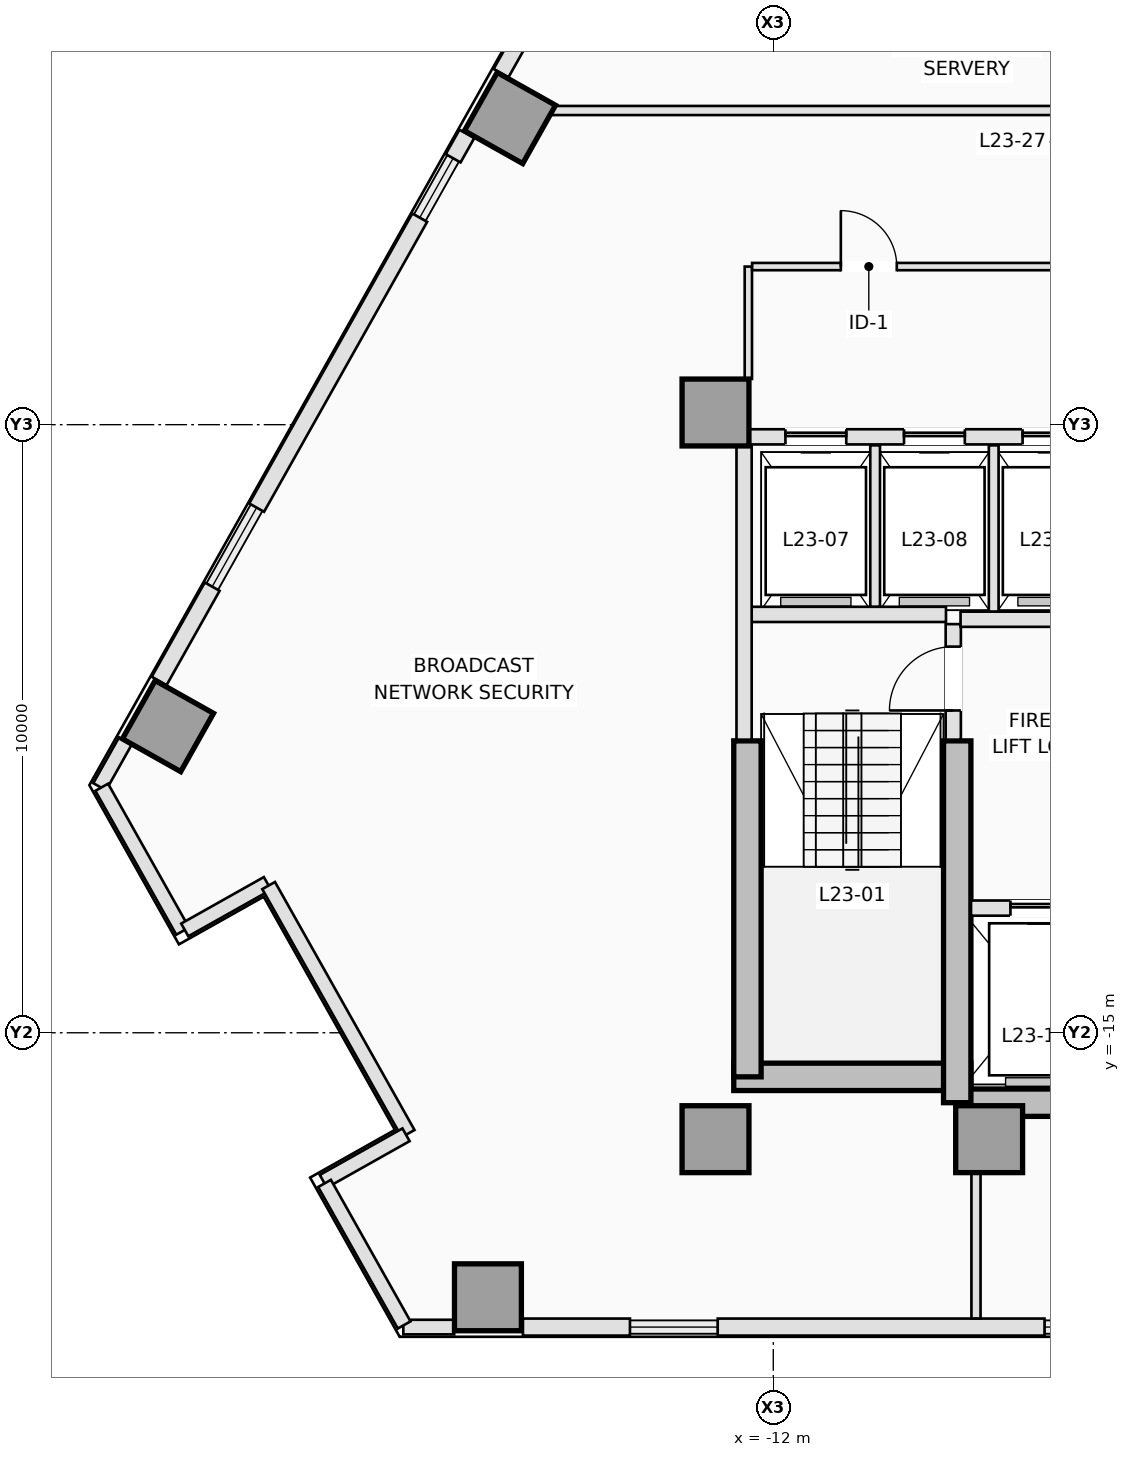
"""IFC4 building model, lengths in metres.
Left out: names, types, materials, properties, quantities, classifications, styles, units other than length and angle.
Written with IfcOpenShell. Run it as: python <this file> out.ifc"""

import sys

from ifc_helpers import new_model, si_unit, direction, frame, frame_2d, origin, origin_2d, place, context, subcontext, project, spatial, rectangle, extrude, element, fill, save


model = new_model("IFC4")
c1 = context("Model", 3, precision=1e-05, world=origin(), true_north=direction((0.0, 1.0)))
c2 = subcontext(c1, "Body", "Model", "MODEL_VIEW")
j1 = project(units=[si_unit("LENGTHUNIT", "METRE"), si_unit("PLANEANGLEUNIT", "RADIAN")], contexts=[c1])
p1 = place(None, origin())
s1 = spatial("IfcSite", under=j1, at=p1, CompositionType="ELEMENT")
p2 = place(p1, origin())
s2 = spatial("IfcBuilding", under=s1, at=p2, CompositionType="ELEMENT")
p3 = place(p2, frame((0.0, 0.0, 87.1)))
s3 = spatial("IfcBuildingStorey", under=s2, at=p3, CompositionType="ELEMENT", Elevation=87.1)
p4 = place(p3, frame((-12.65, -15.725, 0.0), z_axis=(0.0, 0.0, 1.0), x_axis=(1.0, 0.0, 0.0)))
e1 = element("IfcWall", 1, at=p4, inside=s3, PredefinedType="SHEAR", context=c2, shape_type="SweptSolid", body=[
    extrude(rectangle(XDim=3.9, YDim=0.45, at=frame_2d((1.95, 0.0))), origin(), (0.0, 0.0, 1.0), 3.5),
])
p5 = place(p3, frame((-8.975, -16.15, 0.0), z_axis=(0.0, 0.0, 1.0), x_axis=(1.0, 0.0, 0.0)))
e2 = element("IfcWall", 2, at=p5, inside=s3, PredefinedType="SHEAR", context=c2, shape_type="SweptSolid", body=[
    extrude(rectangle(XDim=5.225, YDim=0.45, at=frame_2d((2.613, 0.0))), origin(), (0.0, 0.0, 1.0), 3.5),
])
p6 = place(p3, frame((-12.425, -15.725, 0.0), z_axis=(0.0, 0.0, 1.0), x_axis=(0.0, 1.0, 0.0)))
e3 = element("IfcWall", 3, at=p6, inside=s3, PredefinedType="SHEAR", context=c2, shape_type="SweptSolid", body=[
    extrude(rectangle(XDim=5.525, YDim=0.45, at=frame_2d((2.763, 0.0))), origin(), (0.0, 0.0, 1.0), 3.5),
])
p7 = place(p3, frame((-8.975, -16.15, 0.0), z_axis=(0.0, 0.0, 1.0), x_axis=(0.0, 1.0, 0.0)))
e4 = element("IfcWall", 4, at=p7, inside=s3, PredefinedType="SHEAR", context=c2, shape_type="SweptSolid", body=[
    extrude(rectangle(XDim=5.95, YDim=0.45, at=frame_2d((2.975, 0.0))), origin(), (0.0, 0.0, 1.0), 3.5),
])
for number, where, z_axis, x_axis in (
    (5, (-12.95, -16.75, 0.0), (0.0, 0.0, 1.0), (1.0, 0.0, 0.0)),
    (6, (-8.45, -16.75, 0.0), (0.0, 0.0, 1.0), (1.0, 0.0, 0.0)),
    (7, (-12.95, -4.8, 0.0), (0.0, 0.0, 1.0), (1.0, 0.0, 0.0)),
    (8, (-16.692, -19.35, 0.0), (0.0, 0.0, 1.0), (0.0, 1.0, 0.0)),
    (9, (-16.33, 0.043, 0.0), (0.0, 0.0, 1.0), (-0.872, 0.49, 0.0)),
    (10, (-21.955, -9.957, 0.0), (0.0, 0.0, 1.0), (-0.872, 0.49, 0.0)),
):
    element("IfcColumn", number, at=place(p3, frame(where, z_axis=z_axis, x_axis=x_axis)), inside=s3, PredefinedType="COLUMN", context=c2, shape_type="SweptSolid", body=[
        extrude(rectangle(XDim=1.1, YDim=1.1, at=origin_2d()), origin(), (0.0, 0.0, 1.0), 3.5),
    ])
p8 = place(p3, frame((-17.248, -19.84, 0.0), z_axis=(0.0, 0.0, 1.0), x_axis=(-1.0, 0.0, 0.0)))
e11 = element("IfcWall", 11, at=p8, inside=s3, PredefinedType="STANDARD", context=c2, shape_type="SweptSolid", body=[
    extrude(rectangle(XDim=0.836, YDim=0.24, at=frame_2d((0.418, 0.0))), origin(), (0.0, 0.0, 1.0), 3.14),
])
p9 = place(p3, frame((-7.539, -19.84, 0.0), z_axis=(0.0, 0.0, 1.0), x_axis=(-1.0, 0.0, 0.0)))
e12 = element("IfcWall", 12, at=p9, inside=s3, PredefinedType="STANDARD", context=c2, shape_type="SweptSolid", body=[
    extrude(rectangle(XDim=5.374, YDim=0.28, at=frame_2d((2.687, 0.0))), origin(), (0.0, 0.0, 1.0), 3.14),
])
p10 = place(p3, frame((-14.357, -19.84, 0.0), z_axis=(0.0, 0.0, 1.0), x_axis=(-1.0, 0.0, 0.0)))
e13 = element("IfcWall", 13, at=p10, inside=s3, PredefinedType="STANDARD", context=c2, shape_type="SweptSolid", body=[
    extrude(rectangle(XDim=1.76, YDim=0.28, at=frame_2d((0.88, 0.0))), origin(), (0.0, 0.0, 1.0), 3.14),
])
p11 = place(p3, frame((-23.078, -10.954, 0.0), z_axis=(0.0, 0.0, 1.0), x_axis=(0.490355003566, 0.871522788272, 0.0)))
e14 = element("IfcWall", 14, at=p11, inside=s3, PredefinedType="STANDARD", context=c2, shape_type="SweptSolid", body=[
    extrude(rectangle(XDim=0.865, YDim=0.24, at=frame_2d((0.433, 0.0))), origin(), (0.0, 0.0, 1.0), 3.14),
])
p12 = place(p3, frame((-22.1, -9.215, 0.0), z_axis=(0.0, 0.0, 1.0), x_axis=(0.490248214463, 0.871582863654, 0.0)))
e15 = element("IfcWall", 15, at=p12, inside=s3, PredefinedType="STANDARD", context=c2, shape_type="SweptSolid", body=[
    extrude(rectangle(XDim=1.78, YDim=0.28, at=frame_2d((0.89, 0.0))), origin(), (0.0, 0.0, 1.0), 3.14),
])
p13 = place(p3, frame((-20.496, -6.364, 0.0), z_axis=(0.0, 0.0, 1.0), x_axis=(0.490240051056, 0.87158745536, 0.0)))
e16 = element("IfcWall", 16, at=p13, inside=s3, PredefinedType="STANDARD", context=c2, shape_type="SweptSolid", body=[
    extrude(rectangle(XDim=5.47, YDim=0.28, at=frame_2d((2.735, 0.0))), origin(), (0.0, 0.0, 1.0), 3.14),
])
p14 = place(p3, frame((-17.264, -0.619, 0.0), z_axis=(0.0, 0.0, 1.0), x_axis=(0.490009165718, 0.871717280724, 0.0)))
e17 = element("IfcWall", 17, at=p14, inside=s3, PredefinedType="STANDARD", context=c2, shape_type="SweptSolid", body=[
    extrude(rectangle(XDim=0.46, YDim=0.28, at=frame_2d((0.23, 0.0))), origin(), (0.0, 0.0, 1.0), 3.14),
])
p15 = place(p3, frame((-16.478, 0.78, 0.0), z_axis=(0.0, 0.0, 1.0), x_axis=(0.490280395622, 0.871564761603, 0.0)))
e18 = element("IfcWall", 18, at=p15, inside=s3, PredefinedType="STANDARD", context=c2, shape_type="SweptSolid", body=[
    extrude(rectangle(XDim=4.236, YDim=0.28, at=frame_2d((2.118, 0.0))), origin(), (0.0, 0.0, 1.0), 3.14),
])
p16 = place(p3, frame((-23.044, -10.963, 0.0), z_axis=(0.0, 0.0, 1.0), x_axis=(0.490218533594, -0.871599557894, 0.0)))
e19 = element("IfcWall", 19, at=p16, inside=s3, PredefinedType="STANDARD", context=c2, shape_type="SweptSolid", body=[
    extrude(rectangle(XDim=2.714, YDim=0.24, at=frame_2d((1.357, 0.0))), origin(), (0.0, 0.0, 1.0), 3.14),
])
p17 = place(p3, frame((-21.678, -13.309, 0.0), z_axis=(0.0, 0.0, 1.0), x_axis=(0.871546278971, 0.490313250496, 0.0)))
e20 = element("IfcWall", 20, at=p17, inside=s3, PredefinedType="STANDARD", context=c2, shape_type="SweptSolid", body=[
    extrude(rectangle(XDim=1.56, YDim=0.24, at=frame_2d((0.78, 0.0))), origin(), (0.0, 0.0, 1.0), 3.14),
])
p18 = place(p3, frame((-20.299, -12.579, 0.0), z_axis=(0.0, 0.0, 1.0), x_axis=(0.490313250496, -0.871546278971, 0.0)))
e21 = element("IfcWall", 21, at=p18, inside=s3, PredefinedType="STANDARD", context=c2, shape_type="SweptSolid", body=[
    extrude(rectangle(XDim=4.68, YDim=0.24, at=frame_2d((2.34, 0.0))), origin(), (0.0, 0.0, 1.0), 2.612),
])
p19 = place(p3, frame((-18.039, -16.677, 0.0), z_axis=(0.0, 0.0, 1.0), x_axis=(-0.871546278971, -0.490313250496, 0.0)))
e22 = element("IfcWall", 22, at=p19, inside=s3, PredefinedType="STANDARD", context=c2, shape_type="SweptSolid", body=[
    extrude(rectangle(XDim=1.56, YDim=0.24, at=frame_2d((0.78, 0.0))), origin(), (0.0, 0.0, 1.0), 3.14),
])
p20 = place(p3, frame((-19.379, -17.477, 0.0), z_axis=(0.0, 0.0, 1.0), x_axis=(0.49023085981, -0.871592625078, 0.0)))
e23 = element("IfcWall", 23, at=p20, inside=s3, PredefinedType="STANDARD", context=c2, shape_type="SweptSolid", body=[
    extrude(rectangle(XDim=2.671, YDim=0.24, at=frame_2d((1.335, 0.0))), origin(), (0.0, 0.0, 1.0), 3.14),
])
p21 = place(p3, frame((-9.04, -10.18, 0.0), z_axis=(0.0, 0.0, 1.0), x_axis=(0.0, 1.0, 0.0)))
e24 = element("IfcWall", 24, at=p21, inside=s3, PredefinedType="PARTITIONING", context=c2, shape_type="SweptSolid", body=[
    extrude(rectangle(XDim=1.9, YDim=0.25, at=frame_2d((0.95, 0.0))), origin(), (0.0, 0.0, 1.0), 3.14),
])
p22 = place(p21, frame((0.48, 0.0, 0.0)))
e25 = element("IfcOpeningElement", 25, at=p22, cuts=e24, PredefinedType="OPENING", context=c2, shape_type="SweptSolid", body=[
    extrude(rectangle(XDim=1.05, YDim=2.15, at=frame_2d((0.525, 1.075))), frame((0.0, 0.135, 0.0), z_axis=(0.0, -1.0, 0.0), x_axis=(1.0, 0.0, 0.0)), (0.0, 0.0, 1.0), 0.27),
])
p23 = place(p3, frame((-12.38, -8.12, 0.0), z_axis=(0.0, 0.0, 1.0), x_axis=(1.0, 0.0, 0.0)))
e26 = element("IfcWall", 26, at=p23, inside=s3, PredefinedType="PARTITIONING", context=c2, shape_type="SweptSolid", body=[
    extrude(rectangle(XDim=3.22, YDim=0.25, at=frame_2d((1.61, 0.0))), origin(), (0.0, 0.0, 1.0), 3.14),
])
p24 = place(p3, frame((-12.48, -10.18, 0.0), z_axis=(0.0, 0.0, 1.0), x_axis=(0.0, 1.0, 0.0)))
e27 = element("IfcWall", 27, at=p24, inside=s3, PredefinedType="PARTITIONING", context=c2, shape_type="SweptSolid", body=[
    extrude(rectangle(XDim=4.828, YDim=0.25, at=frame_2d((2.414, 0.0))), origin(), (0.0, 0.0, 1.0), 3.14),
])
p25 = place(p3, frame((-8.748, -12.95, 0.0), z_axis=(0.0, 0.0, 1.0), x_axis=(1.0, 0.0, 0.0)))
e28 = element("IfcWall", 28, at=p25, inside=s3, PredefinedType="PARTITIONING", context=c2, shape_type="SweptSolid", body=[
    extrude(rectangle(XDim=5.068, YDim=0.25, at=frame_2d((2.534, 0.0))), origin(), (0.0, 0.0, 1.0), 3.14),
])
p26 = place(p25, frame((0.648, 0.0, 0.0)))
e29 = element("IfcOpeningElement", 29, at=p26, cuts=e28, PredefinedType="OPENING", context=c2, shape_type="SweptSolid", body=[
    extrude(rectangle(XDim=1.1, YDim=2.15, at=frame_2d((0.55, 1.075))), frame((0.0, 0.135, 0.0), z_axis=(0.0, -1.0, 0.0), x_axis=(1.0, 0.0, 0.0)), (0.0, 0.0, 1.0), 0.27),
])
p27 = place(p25, frame((2.548, 0.0, 0.0)))
e30 = element("IfcOpeningElement", 30, at=p27, cuts=e28, PredefinedType="OPENING", context=c2, shape_type="SweptSolid", body=[
    extrude(rectangle(XDim=0.88, YDim=2.1, at=frame_2d((0.44, 1.05))), frame((0.0, 0.135, 0.0), z_axis=(0.0, -1.0, 0.0), x_axis=(1.0, 0.0, 0.0)), (0.0, 0.0, 1.0), 0.27),
])
p28 = place(p25, frame((3.948, 0.0, 0.0)))
e31 = element("IfcOpeningElement", 31, at=p28, cuts=e28, PredefinedType="OPENING", context=c2, shape_type="SweptSolid", body=[
    extrude(rectangle(XDim=0.88, YDim=2.1, at=frame_2d((0.44, 1.05))), frame((0.0, 0.135, 0.0), z_axis=(0.0, -1.0, 0.0), x_axis=(1.0, 0.0, 0.0)), (0.0, 0.0, 1.0), 0.27),
])
p29 = place(p3, frame((-8.92, -8.2, 0.0), z_axis=(0.0, 0.0, 1.0), x_axis=(1.0, 0.0, 0.0)))
e32 = element("IfcWall", 32, at=p29, inside=s3, PredefinedType="PARTITIONING", context=c2, shape_type="SweptSolid", body=[
    extrude(rectangle(XDim=5.24, YDim=0.25, at=frame_2d((2.62, 0.0))), origin(), (0.0, 0.0, 1.0), 3.14),
])
p30 = place(p3, frame((-12.398, -5.2, 0.0), z_axis=(0.0, 0.0, 1.0), x_axis=(1.0, 0.0, 0.0)))
e33 = element("IfcWall", 33, at=p30, inside=s3, PredefinedType="PARTITIONING", context=c2, shape_type="SweptSolid", body=[
    extrude(rectangle(XDim=8.096, YDim=0.25, at=frame_2d((4.048, 0.0))), origin(), (0.0, 0.0, 1.0), 3.14),
])
p31 = place(p30, frame((0.598, 0.0, 0.0)))
e34 = element("IfcOpeningElement", 34, at=p31, cuts=e33, PredefinedType="OPENING", context=c2, shape_type="SweptSolid", body=[
    extrude(rectangle(XDim=1.0, YDim=2.15, at=frame_2d((0.5, 1.075))), frame((0.0, 0.135, 0.0), z_axis=(0.0, -1.0, 0.0), x_axis=(1.0, 0.0, 0.0)), (0.0, 0.0, 1.0), 0.27),
])
p32 = place(p30, frame((2.548, 0.0, 0.0)))
e35 = element("IfcOpeningElement", 35, at=p32, cuts=e33, PredefinedType="OPENING", context=c2, shape_type="SweptSolid", body=[
    extrude(rectangle(XDim=1.0, YDim=2.15, at=frame_2d((0.5, 1.075))), frame((0.0, 0.135, 0.0), z_axis=(0.0, -1.0, 0.0), x_axis=(1.0, 0.0, 0.0)), (0.0, 0.0, 1.0), 0.27),
])
p33 = place(p30, frame((4.498, 0.0, 0.0)))
e36 = element("IfcOpeningElement", 36, at=p33, cuts=e33, PredefinedType="OPENING", context=c2, shape_type="SweptSolid", body=[
    extrude(rectangle(XDim=1.0, YDim=2.15, at=frame_2d((0.5, 1.075))), frame((0.0, 0.135, 0.0), z_axis=(0.0, -1.0, 0.0), x_axis=(1.0, 0.0, 0.0)), (0.0, 0.0, 1.0), 0.27),
])
p34 = place(p30, frame((6.448, 0.0, 0.0)))
e37 = element("IfcOpeningElement", 37, at=p34, cuts=e33, PredefinedType="OPENING", context=c2, shape_type="SweptSolid", body=[
    extrude(rectangle(XDim=1.0, YDim=2.15, at=frame_2d((0.5, 1.075))), frame((0.0, 0.135, 0.0), z_axis=(0.0, -1.0, 0.0), x_axis=(1.0, 0.0, 0.0)), (0.0, 0.0, 1.0), 0.27),
])
p35 = place(p3, frame((-10.325, -7.993, 0.0), z_axis=(0.0, 0.0, 1.0), x_axis=(0.0, 1.0, 0.0)))
e38 = element("IfcWall", 38, at=p35, inside=s3, PredefinedType="PARTITIONING", context=c2, shape_type="SweptSolid", body=[
    extrude(rectangle(XDim=2.653, YDim=0.16, at=frame_2d((1.326, 0.0))), origin(), (0.0, 0.0, 1.0), 3.14),
])
p36 = place(p3, frame((-8.375, -8.073, 0.0), z_axis=(0.0, 0.0, 1.0), x_axis=(0.0, 1.0, 0.0)))
e39 = element("IfcWall", 39, at=p36, inside=s3, PredefinedType="PARTITIONING", context=c2, shape_type="SweptSolid", body=[
    extrude(rectangle(XDim=2.733, YDim=0.16, at=frame_2d((1.366, 0.0))), origin(), (0.0, 0.0, 1.0), 3.14),
])
p37 = place(p3, frame((-12.41, -4.248, 0.0), z_axis=(0.0, 0.0, 1.0), x_axis=(0.0, 1.0, 0.0)))
e40 = element("IfcWall", 40, at=p37, inside=s3, PredefinedType="PARTITIONING", context=c2, shape_type="SweptSolid", body=[
    extrude(rectangle(XDim=1.848, YDim=0.12, at=frame_2d((0.924, 0.0))), origin(), (0.0, 0.0, 1.0), 3.14),
])
p38 = place(p3, frame((-12.348, -2.4, 0.0), z_axis=(0.0, 0.0, 1.0), x_axis=(1.0, 0.0, 0.0)))
e41 = element("IfcWall", 41, at=p38, inside=s3, PredefinedType="PARTITIONING", context=c2, shape_type="SweptSolid", body=[
    extrude(rectangle(XDim=5.786, YDim=0.12, at=frame_2d((2.893, 0.0))), origin(), (0.0, 0.0, 1.0), 3.14),
])
p39 = place(p38, frame((1.459, 0.0, 0.0)))
e42 = element("IfcOpeningElement", 42, at=p39, cuts=e41, PredefinedType="OPENING", context=c2, shape_type="SweptSolid", body=[
    extrude(rectangle(XDim=0.92, YDim=2.12, at=frame_2d((0.46, 1.06))), frame((0.0, 0.07, 0.0), z_axis=(0.0, -1.0, 0.0), x_axis=(1.0, 0.0, 0.0)), (0.0, 0.0, 1.0), 0.14),
])
p40 = place(p3, frame((-6.62, 0.167, 0.0), z_axis=(0.0, 0.0, 1.0), x_axis=(-1.0, 0.0, 0.0)))
e43 = element("IfcWall", 43, at=p40, inside=s3, PredefinedType="PARTITIONING", context=c2, shape_type="SweptSolid", body=[
    extrude(rectangle(XDim=9.007, YDim=0.15, at=frame_2d((4.503, 0.0))), origin(), (0.0, 0.0, 1.0), 3.14),
])
p41 = place(p3, frame((-8.667, -17.302, 0.0), z_axis=(0.0, 0.0, 1.0), x_axis=(0.0, -1.0, 0.0)))
e44 = element("IfcWall", 44, at=p41, inside=s3, PredefinedType="PARTITIONING", context=c2, shape_type="SweptSolid", body=[
    extrude(rectangle(XDim=2.396, YDim=0.15, at=frame_2d((1.198, 0.0))), origin(), (0.0, 0.0, 1.0), 3.14),
])
p42 = place(p31, origin())
e45 = element("IfcDoor", 45, at=p42, inside=s3, OperationType="SLIDING_TO_LEFT", PredefinedType="DOOR", context=c2, shape_type="SweptSolid", body=[
    extrude(rectangle(XDim=1.0, YDim=2.15, at=frame_2d((0.5, 1.075))), frame((0.0, 0.025, 0.0), z_axis=(0.0, -1.0, 0.0), x_axis=(1.0, 0.0, 0.0)), (0.0, 0.0, 1.0), 0.05),
])
fill(e34, e45)
p43 = place(p32, origin())
e46 = element("IfcDoor", 46, at=p43, inside=s3, OperationType="SLIDING_TO_LEFT", PredefinedType="DOOR", context=c2, shape_type="SweptSolid", body=[
    extrude(rectangle(XDim=1.0, YDim=2.15, at=frame_2d((0.5, 1.075))), frame((0.0, 0.025, 0.0), z_axis=(0.0, -1.0, 0.0), x_axis=(1.0, 0.0, 0.0)), (0.0, 0.0, 1.0), 0.05),
])
fill(e35, e46)
p44 = place(p33, origin())
e47 = element("IfcDoor", 47, at=p44, inside=s3, OperationType="SLIDING_TO_LEFT", PredefinedType="DOOR", context=c2, shape_type="SweptSolid", body=[
    extrude(rectangle(XDim=1.0, YDim=2.15, at=frame_2d((0.5, 1.075))), frame((0.0, 0.025, 0.0), z_axis=(0.0, -1.0, 0.0), x_axis=(1.0, 0.0, 0.0)), (0.0, 0.0, 1.0), 0.05),
])
fill(e36, e47)
p45 = place(p26, origin())
e48 = element("IfcDoor", 48, at=p45, inside=s3, OperationType="SLIDING_TO_LEFT", PredefinedType="DOOR", context=c2, shape_type="SweptSolid", body=[
    extrude(rectangle(XDim=1.1, YDim=2.15, at=frame_2d((0.55, 1.075))), frame((0.0, 0.025, 0.0), z_axis=(0.0, -1.0, 0.0), x_axis=(1.0, 0.0, 0.0)), (0.0, 0.0, 1.0), 0.05),
])
fill(e29, e48)
p46 = place(p22, origin())
e49 = element("IfcDoor", 49, at=p46, inside=s3, OperationType="SINGLE_SWING_LEFT", PredefinedType="DOOR", context=c2, shape_type="SweptSolid", body=[
    extrude(rectangle(XDim=1.05, YDim=2.15, at=frame_2d((0.525, 1.075))), frame((0.0, 0.025, 0.0), z_axis=(0.0, -1.0, 0.0), x_axis=(1.0, 0.0, 0.0)), (0.0, 0.0, 1.0), 0.05),
])
fill(e25, e49)
p47 = place(p39, origin())
e50 = element("IfcDoor", 50, at=p47, inside=s3, OperationType="SINGLE_SWING_LEFT", PredefinedType="DOOR", context=c2, shape_type="SweptSolid", body=[
    extrude(rectangle(XDim=0.92, YDim=2.12, at=frame_2d((0.46, 1.06))), frame((0.0, 0.025, 0.0), z_axis=(0.0, -1.0, 0.0), x_axis=(1.0, 0.0, 0.0)), (0.0, 0.0, 1.0), 0.05),
])
fill(e42, e50)
save(model, sys.argv[1])
